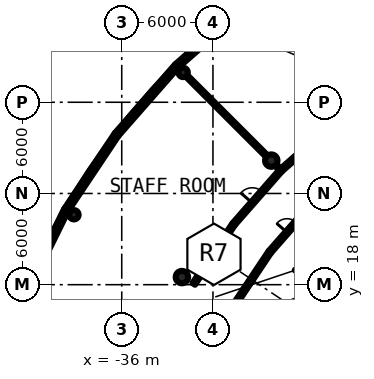
"""IFC4 building model, lengths in metres.
Left out: names, types, materials, properties, quantities, classifications, styles, units other than length and angle.
Written with IfcOpenShell. Run it as: python <this file> out.ifc"""

import sys

from ifc_helpers import new_model, si_unit, direction, frame, frame_2d, origin, origin_2d, place, context, subcontext, project, spatial, rectangle, hollow_circle, extrude, element, fill, save


model = new_model("IFC4")
c1 = context("Model", 3, precision=1e-05, world=origin(), true_north=direction((0.0, 1.0)))
c2 = subcontext(c1, "Body", "Model", "MODEL_VIEW")
j1 = project(units=[si_unit("LENGTHUNIT", "METRE"), si_unit("PLANEANGLEUNIT", "RADIAN")], contexts=[c1])
p1 = place(None, origin())
s1 = spatial("IfcSite", under=j1, at=p1, CompositionType="ELEMENT")
p2 = place(p1, origin())
s2 = spatial("IfcBuilding", under=s1, at=p2, CompositionType="ELEMENT")
p3 = place(p2, frame((0.0, 0.0, 5.4)))
s3 = spatial("IfcBuildingStorey", under=s2, at=p3, CompositionType="ELEMENT", Elevation=5.4)
for number, where, z_axis, x_axis in (
    (1, (-26.163, 26.163, 0.0), (0.0, 0.0, 1.0), (1.0, 0.0, 0.0)),
    (2, (-32.043, 18.5, 0.0), (0.0, 0.0, 1.0), (1.0, 0.0, 0.0)),
):
    element("IfcColumn", number, at=place(p3, frame(where, z_axis=z_axis, x_axis=x_axis)), inside=s3, PredefinedType="COLUMN", context=c2, shape_type="SweptSolid", body=[
        extrude(hollow_circle(Radius=0.406, WallThickness=0.03, at=origin_2d()), origin(), (0.0, 0.0, 1.0), 4.2),
    ])
for number, where, z_axis, x_axis in (
    (3, (-31.961, 31.961, 0.0), (0.0, 0.0, 1.0), (1.0, 0.0, 0.0)),
    (4, (-39.144, 22.6, 0.0), (0.0, 0.0, 1.0), (1.0, 0.0, 0.0)),
):
    element("IfcColumn", number, at=place(p3, frame(where, z_axis=z_axis, x_axis=x_axis)), inside=s3, PredefinedType="COLUMN", context=c2, shape_type="SweptSolid", body=[
        extrude(hollow_circle(Radius=0.305, WallThickness=0.025, at=origin_2d()), origin(), (0.0, 0.0, 1.0), 4.2),
    ])
p4 = place(p3, frame((-27.881, 36.336, 0.0), z_axis=(0.0, 0.0, 1.0), x_axis=(-0.751748126189, -0.659450342916, 0.0)))
e5 = element("IfcWall", 5, at=p4, inside=s3, PredefinedType="SOLIDWALL", context=c2, shape_type="SweptSolid", body=[
    extrude(rectangle(XDim=5.991, YDim=0.3, at=frame_2d((2.996, 0.0))), origin(), (0.0, 0.0, 1.0), 3.7),
])
p5 = place(p4, frame((1.495, 0.0, 1.0)))
e6 = element("IfcOpeningElement", 6, at=p5, cuts=e5, PredefinedType="OPENING", context=c2, shape_type="SweptSolid", body=[
    extrude(rectangle(XDim=3.0, YDim=2.0, at=frame_2d((1.5, 1.0))), frame((0.0, 0.16, 0.0), z_axis=(0.0, -1.0, 0.0), x_axis=(1.0, 0.0, 0.0)), (0.0, 0.0, 1.0), 0.32),
])
p6 = place(p3, frame((-32.385, 32.385, 0.0), z_axis=(0.0, 0.0, 1.0), x_axis=(-0.659450342916, -0.751748126189, 0.0)))
e7 = element("IfcWall", 7, at=p6, inside=s3, PredefinedType="SOLIDWALL", context=c2, shape_type="SweptSolid", body=[
    extrude(rectangle(XDim=5.991, YDim=0.3, at=frame_2d((2.996, 0.0))), origin(), (0.0, 0.0, 1.0), 3.7),
])
p7 = place(p6, frame((1.495, 0.0, 1.0)))
e8 = element("IfcOpeningElement", 8, at=p7, cuts=e7, PredefinedType="OPENING", context=c2, shape_type="SweptSolid", body=[
    extrude(rectangle(XDim=3.0, YDim=2.0, at=frame_2d((1.5, 1.0))), frame((0.0, 0.16, 0.0), z_axis=(0.0, -1.0, 0.0), x_axis=(1.0, 0.0, 0.0)), (0.0, 0.0, 1.0), 0.32),
])
p8 = place(p3, frame((-36.336, 27.881, 0.0), z_axis=(0.0, 0.0, 1.0), x_axis=(-0.55554631985, -0.831485590074, 0.0)))
e9 = element("IfcWall", 9, at=p8, inside=s3, PredefinedType="SOLIDWALL", context=c2, shape_type="SweptSolid", body=[
    extrude(rectangle(XDim=5.991, YDim=0.3, at=frame_2d((2.995, 0.0))), origin(), (0.0, 0.0, 1.0), 3.7),
])
p9 = place(p8, frame((1.495, 0.0, 1.0)))
e10 = element("IfcOpeningElement", 10, at=p9, cuts=e9, PredefinedType="OPENING", context=c2, shape_type="SweptSolid", body=[
    extrude(rectangle(XDim=3.0, YDim=2.0, at=frame_2d((1.5, 1.0))), frame((0.0, 0.16, 0.0), z_axis=(0.0, -1.0, 0.0), x_axis=(1.0, 0.0, 0.0)), (0.0, 0.0, 1.0), 0.32),
])
p10 = place(p3, frame((-39.664, 22.9, 0.0), z_axis=(0.0, 0.0, 1.0), x_axis=(-0.44233289833, -0.896850939151, 0.0)))
e11 = element("IfcWall", 11, at=p10, inside=s3, PredefinedType="SOLIDWALL", context=c2, shape_type="SweptSolid", body=[
    extrude(rectangle(XDim=5.991, YDim=0.3, at=frame_2d((2.995, 0.0))), origin(), (0.0, 0.0, 1.0), 3.7),
])
p11 = place(p10, frame((1.495, 0.0, 1.0)))
e12 = element("IfcOpeningElement", 12, at=p11, cuts=e11, PredefinedType="OPENING", context=c2, shape_type="SweptSolid", body=[
    extrude(rectangle(XDim=3.0, YDim=2.0, at=frame_2d((1.5, 1.0))), frame((0.0, 0.16, 0.0), z_axis=(0.0, -1.0, 0.0), x_axis=(1.0, 0.0, 0.0)), (0.0, 0.0, 1.0), 0.32),
])
p12 = place(p3, frame((-31.746, 31.746, 0.0), z_axis=(0.0, 0.0, 1.0), x_axis=(0.707106781187, -0.707106781187, 0.0)))
e13 = element("IfcWall", 13, at=p12, inside=s3, PredefinedType="PARTITIONING", context=c2, shape_type="SweptSolid", body=[
    extrude(rectangle(XDim=7.49, YDim=0.15, at=frame_2d((3.745, 0.0))), origin(), (0.0, 0.0, 1.0), 3.7),
])
p13 = place(p3, frame((-25.876, 25.876, 0.0), z_axis=(0.0, 0.0, 1.0), x_axis=(0.707106781187, -0.707106781187, 0.0)))
e14 = element("IfcWall", 14, at=p13, inside=s3, PredefinedType="PARTITIONING", context=c2, shape_type="SweptSolid", body=[
    extrude(rectangle(XDim=0.493, YDim=0.15, at=frame_2d((0.247, 0.0))), origin(), (0.0, 0.0, 1.0), 3.7),
])
p14 = place(p3, frame((-25.288, 14.6, 0.0), z_axis=(0.0, 0.0, 1.0), x_axis=(0.555584916278, 0.831459801075, 0.0)))
e15 = element("IfcWall", 15, at=p14, inside=s3, PredefinedType="PARTITIONING", context=c2, shape_type="SweptSolid", body=[
    extrude(rectangle(XDim=3.82, YDim=0.15, at=frame_2d((1.91, 0.0))), origin(), (0.0, 0.0, 1.0), 3.7),
])
p15 = place(p3, frame((-28.665, 16.55, 0.0), z_axis=(0.0, 0.0, 1.0), x_axis=(0.555519783102, 0.831503319646, 0.0)))
e16 = element("IfcWall", 16, at=p15, inside=s3, PredefinedType="PARTITIONING", context=c2, shape_type="SweptSolid", body=[
    extrude(rectangle(XDim=4.329, YDim=0.2, at=frame_2d((2.165, 0.0))), origin(), (0.0, 0.0, 1.0), 3.7),
])
p16 = place(p3, frame((-26.26, 20.15, 0.0), z_axis=(0.0, 0.0, 1.0), x_axis=(0.659386383125, 0.75180422834, 0.0)))
e17 = element("IfcWall", 17, at=p16, inside=s3, PredefinedType="PARTITIONING", context=c2, shape_type="SweptSolid", body=[
    extrude(rectangle(XDim=4.33, YDim=0.2, at=frame_2d((2.165, 0.0))), origin(), (0.0, 0.0, 1.0), 3.7),
])
p17 = place(p16, frame((1.715, 0.0, 0.0)))
e18 = element("IfcOpeningElement", 18, at=p17, cuts=e17, PredefinedType="OPENING", context=c2, shape_type="SweptSolid", body=[
    extrude(rectangle(XDim=0.9, YDim=2.3, at=frame_2d((0.45, 1.15))), frame((0.0, 0.11, 0.0), z_axis=(0.0, -1.0, 0.0), x_axis=(1.0, 0.0, 0.0)), (0.0, 0.0, 1.0), 0.22),
])
p18 = place(p3, frame((-31.264, 18.05, 0.0), z_axis=(0.0, 0.0, 1.0), x_axis=(0.555678147384, 0.831397496099, 0.0)))
e19 = element("IfcWall", 19, at=p18, inside=s3, PredefinedType="PARTITIONING", context=c2, shape_type="SweptSolid", body=[
    extrude(rectangle(XDim=4.722, YDim=0.2, at=frame_2d((2.361, 0.0))), origin(), (0.0, 0.0, 1.0), 3.7),
])
p19 = place(p3, frame((-28.64, 21.976, 0.0), z_axis=(0.0, 0.0, 1.0), x_axis=(0.659181480716, 0.751983893099, 0.0)))
e20 = element("IfcWall", 20, at=p19, inside=s3, PredefinedType="PARTITIONING", context=c2, shape_type="SweptSolid", body=[
    extrude(rectangle(XDim=4.722, YDim=0.2, at=frame_2d((2.361, 0.0))), origin(), (0.0, 0.0, 1.0), 3.7),
])
p20 = place(p19, frame((1.861, 0.0, 0.0)))
e21 = element("IfcOpeningElement", 21, at=p20, cuts=e20, PredefinedType="OPENING", context=c2, shape_type="SweptSolid", body=[
    extrude(rectangle(XDim=1.0, YDim=2.3, at=frame_2d((0.5, 1.15))), frame((0.0, 0.11, 0.0), z_axis=(0.0, -1.0, 0.0), x_axis=(1.0, 0.0, 0.0)), (0.0, 0.0, 1.0), 0.22),
])
p21 = place(p3, frame((-25.527, 25.527, 0.0), z_axis=(0.0, 0.0, 1.0), x_axis=(0.751983893099, 0.659181480716, 0.0)))
e22 = element("IfcWall", 22, at=p21, inside=s3, PredefinedType="PARTITIONING", context=c2, shape_type="SweptSolid", body=[
    extrude(rectangle(XDim=4.722, YDim=0.2, at=frame_2d((2.361, 0.0))), origin(), (0.0, 0.0, 1.0), 3.7),
])
p22 = place(p7, origin())
e23 = element("IfcWindow", 23, at=p22, inside=s3, PartitioningType="SINGLE_PANEL", PredefinedType="WINDOW", context=c2, shape_type="SweptSolid", body=[
    extrude(rectangle(XDim=3.0, YDim=2.0, at=frame_2d((1.5, 1.0))), frame((0.0, 0.03, 0.0), z_axis=(0.0, -1.0, 0.0), x_axis=(1.0, 0.0, 0.0)), (0.0, 0.0, 1.0), 0.06),
])
fill(e8, e23)
p23 = place(p9, origin())
e24 = element("IfcWindow", 24, at=p23, inside=s3, PartitioningType="SINGLE_PANEL", PredefinedType="WINDOW", context=c2, shape_type="SweptSolid", body=[
    extrude(rectangle(XDim=3.0, YDim=2.0, at=frame_2d((1.5, 1.0))), frame((0.0, 0.03, 0.0), z_axis=(0.0, -1.0, 0.0), x_axis=(1.0, 0.0, 0.0)), (0.0, 0.0, 1.0), 0.06),
])
fill(e10, e24)
p24 = place(p11, origin())
e25 = element("IfcWindow", 25, at=p24, inside=s3, PartitioningType="SINGLE_PANEL", PredefinedType="WINDOW", context=c2, shape_type="SweptSolid", body=[
    extrude(rectangle(XDim=3.0, YDim=2.0, at=frame_2d((1.5, 1.0))), frame((0.0, 0.03, 0.0), z_axis=(0.0, -1.0, 0.0), x_axis=(1.0, 0.0, 0.0)), (0.0, 0.0, 1.0), 0.06),
])
fill(e12, e25)
p25 = place(p17, origin())
e26 = element("IfcDoor", 26, at=p25, inside=s3, OperationType="SINGLE_SWING_RIGHT", PredefinedType="DOOR", context=c2, shape_type="SweptSolid", body=[
    extrude(rectangle(XDim=0.9, YDim=2.3, at=frame_2d((0.45, 1.15))), frame((0.0, 0.025, 0.0), z_axis=(0.0, -1.0, 0.0), x_axis=(1.0, 0.0, 0.0)), (0.0, 0.0, 1.0), 0.05),
])
fill(e18, e26)
p26 = place(p20, origin())
e27 = element("IfcDoor", 27, at=p26, inside=s3, OperationType="SINGLE_SWING_RIGHT", PredefinedType="DOOR", context=c2, shape_type="SweptSolid", body=[
    extrude(rectangle(XDim=1.0, YDim=2.3, at=frame_2d((0.5, 1.15))), frame((0.0, 0.025, 0.0), z_axis=(0.0, -1.0, 0.0), x_axis=(1.0, 0.0, 0.0)), (0.0, 0.0, 1.0), 0.05),
])
fill(e21, e27)
save(model, sys.argv[1])
